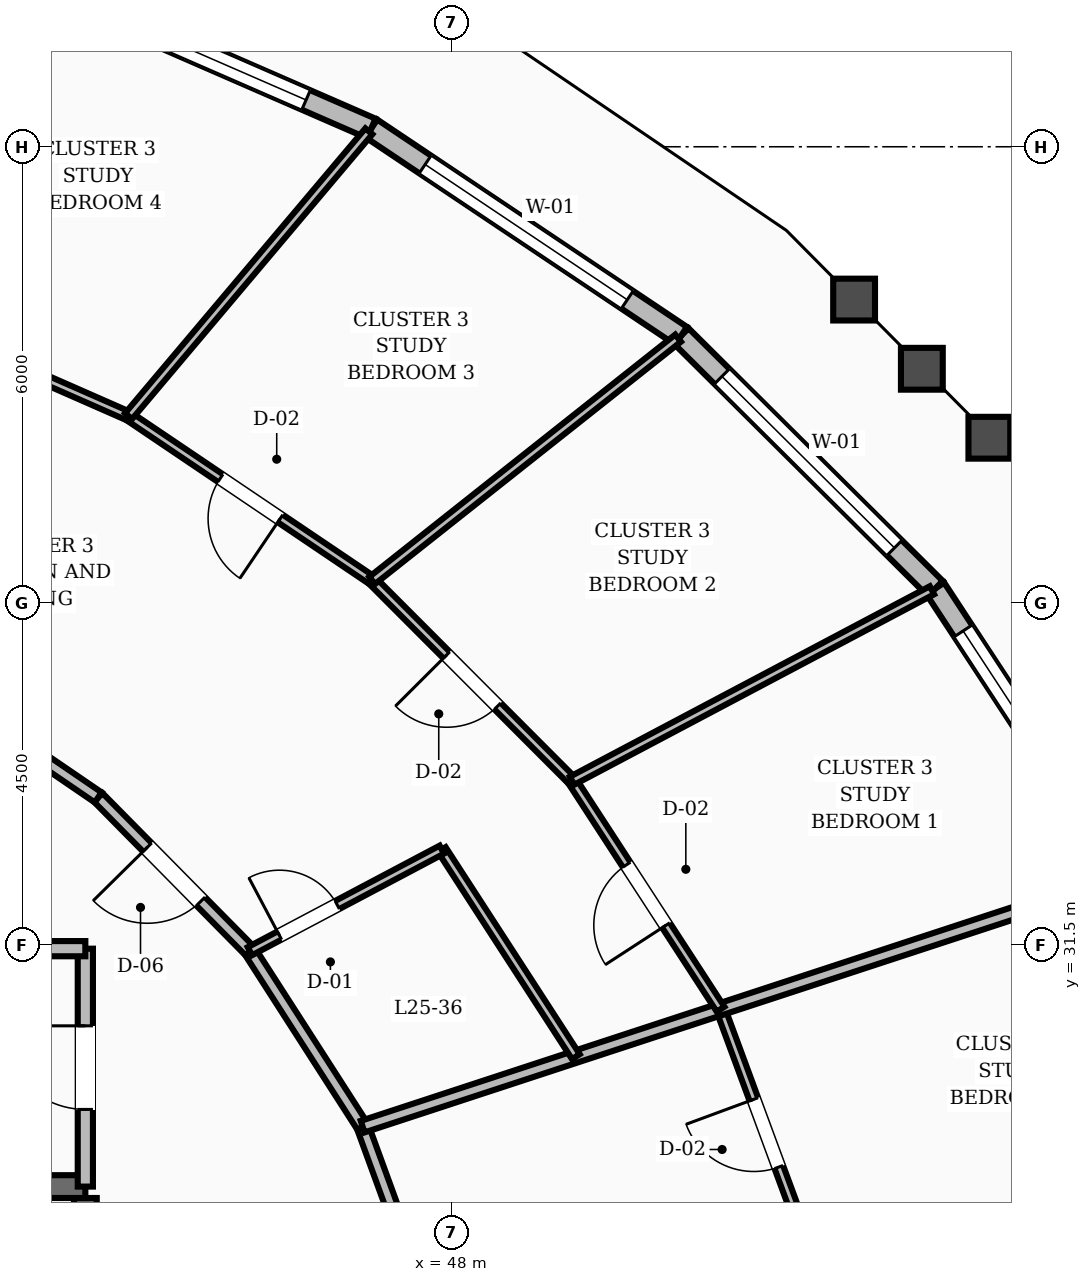
"""IFC4 building model, lengths in metres.
Left out: names, types, materials, properties, quantities, classifications, styles, units other than length and angle.
Written with IfcOpenShell. Run it as: python <this file> out.ifc"""

import sys

from ifc_helpers import new_model, si_unit, direction, frame, frame_2d, origin, place, context, subcontext, project, spatial, rectangle, extrude, element, fill, save


model = new_model("IFC4")
c1 = context("Model", 3, precision=1e-05, world=origin(), true_north=direction((0.0, 1.0)))
c2 = subcontext(c1, "Body", "Model", "MODEL_VIEW")
j1 = project(units=[si_unit("LENGTHUNIT", "METRE"), si_unit("PLANEANGLEUNIT", "RADIAN")], contexts=[c1])
p1 = place(None, origin())
s1 = spatial("IfcSite", under=j1, at=p1, CompositionType="ELEMENT")
p2 = place(p1, origin())
s2 = spatial("IfcBuilding", under=s1, at=p2, CompositionType="ELEMENT")
p3 = place(p2, frame((0.0, 0.0, 98.8)))
s3 = spatial("IfcBuildingStorey", under=s2, at=p3, CompositionType="ELEMENT", Elevation=98.8)
p4 = place(p3, frame((43.18, 19.43, 0.0), z_axis=(0.0, 0.0, 1.0), x_axis=(0.0, 1.0, 0.0)))
e1 = element("IfcWall", 1, at=p4, inside=s3, PredefinedType="SHEAR", context=c2, shape_type="SweptSolid", body=[
    extrude(rectangle(XDim=8.74, YDim=0.3, at=frame_2d((4.37, 0.0))), origin(), (0.0, 0.0, 1.0), 3.6),
])
p5 = place(p3, frame((39.58, 28.32, 0.0), z_axis=(0.0, 0.0, 1.0), x_axis=(1.0, 0.0, 0.0)))
e2 = element("IfcWall", 2, at=p5, inside=s3, PredefinedType="SHEAR", context=c2, shape_type="SweptSolid", body=[
    extrude(rectangle(XDim=3.6, YDim=0.3, at=frame_2d((1.8, 0.0))), origin(), (0.0, 0.0, 1.0), 3.6),
])
p6 = place(p5, frame((1.3, 0.0, 0.0)))
e3 = element("IfcOpeningElement", 3, at=p6, cuts=e2, PredefinedType="OPENING", context=c2, shape_type="SweptSolid", body=[
    extrude(rectangle(XDim=1.1, YDim=2.1, at=frame_2d((0.55, 1.05))), frame((0.0, 0.16, 0.0), z_axis=(0.0, -1.0, 0.0), x_axis=(1.0, 0.0, 0.0)), (0.0, 0.0, 1.0), 0.32),
])
p7 = place(p3, frame((56.848, 32.396, 0.0), z_axis=(0.0, 0.0, 1.0), x_axis=(-0.548073017765, 0.836430491552, 0.0)))
e4 = element("IfcWall", 4, at=p7, inside=s3, PredefinedType="STANDARD", context=c2, shape_type="SweptSolid", body=[
    extrude(rectangle(XDim=4.535, YDim=0.28, at=frame_2d((2.267, 0.0))), origin(), (0.0, 0.0, 1.0), 2.71),
])
p8 = place(p7, frame((0.667, 0.0, 0.8)))
e5 = element("IfcOpeningElement", 5, at=p8, cuts=e4, PredefinedType="OPENING", context=c2, shape_type="SweptSolid", body=[
    extrude(rectangle(XDim=3.2, YDim=1.65, at=frame_2d((1.6, 0.825))), frame((0.0, 0.15, 0.0), z_axis=(0.0, -1.0, 0.0), x_axis=(1.0, 0.0, 0.0)), (0.0, 0.0, 1.0), 0.3),
])
p9 = place(p3, frame((54.362, 36.188, 0.0), z_axis=(0.0, 0.0, 1.0), x_axis=(-0.709251981277, 0.704955053216, 0.0)))
e6 = element("IfcWall", 6, at=p9, inside=s3, PredefinedType="STANDARD", context=c2, shape_type="SweptSolid", body=[
    extrude(rectangle(XDim=4.716, YDim=0.28, at=frame_2d((2.358, 0.0))), origin(), (0.0, 0.0, 1.0), 2.71),
])
p10 = place(p9, frame((0.758, 0.0, 0.8)))
e7 = element("IfcOpeningElement", 7, at=p10, cuts=e6, PredefinedType="OPENING", context=c2, shape_type="SweptSolid", body=[
    extrude(rectangle(XDim=3.2, YDim=1.65, at=frame_2d((1.6, 0.825))), frame((0.0, 0.15, 0.0), z_axis=(0.0, -1.0, 0.0), x_axis=(1.0, 0.0, 0.0)), (0.0, 0.0, 1.0), 0.3),
])
p11 = place(p3, frame((51.018, 39.513, 0.0), z_axis=(0.0, 0.0, 1.0), x_axis=(-0.83098422739, 0.556295976822, 0.0)))
e8 = element("IfcWall", 8, at=p11, inside=s3, PredefinedType="STANDARD", context=c2, shape_type="SweptSolid", body=[
    extrude(rectangle(XDim=4.904, YDim=0.28, at=frame_2d((2.452, 0.0))), origin(), (0.0, 0.0, 1.0), 2.71),
])
p12 = place(p11, frame((0.852, 0.0, 0.8)))
e9 = element("IfcOpeningElement", 9, at=p12, cuts=e8, PredefinedType="OPENING", context=c2, shape_type="SweptSolid", body=[
    extrude(rectangle(XDim=3.2, YDim=1.65, at=frame_2d((1.6, 0.825))), frame((0.0, 0.15, 0.0), z_axis=(0.0, -1.0, 0.0), x_axis=(1.0, 0.0, 0.0)), (0.0, 0.0, 1.0), 0.3),
])
p13 = place(p3, frame((46.942, 42.241, 0.0), z_axis=(0.0, 0.0, 1.0), x_axis=(-0.9166625106, 0.399662159405, 0.0)))
e10 = element("IfcWall", 10, at=p13, inside=s3, PredefinedType="STANDARD", context=c2, shape_type="SweptSolid", body=[
    extrude(rectangle(XDim=5.073, YDim=0.28, at=frame_2d((2.536, 0.0))), origin(), (0.0, 0.0, 1.0), 2.71),
])
p14 = place(p13, frame((0.936, 0.0, 0.8)))
e11 = element("IfcOpeningElement", 11, at=p14, cuts=e10, PredefinedType="OPENING", context=c2, shape_type="SweptSolid", body=[
    extrude(rectangle(XDim=3.2, YDim=1.65, at=frame_2d((1.6, 0.825))), frame((0.0, 0.15, 0.0), z_axis=(0.0, -1.0, 0.0), x_axis=(1.0, 0.0, 0.0)), (0.0, 0.0, 1.0), 0.3),
])
p15 = place(p3, frame((43.18, 28.32, 0.0), z_axis=(0.0, 0.0, 1.0), x_axis=(0.0, 1.0, 0.0)))
e12 = element("IfcWall", 12, at=p15, inside=s3, PredefinedType="SOLIDWALL", context=c2, shape_type="SweptSolid", body=[
    extrude(rectangle(XDim=3.13, YDim=0.2, at=frame_2d((1.565, 0.0))), origin(), (0.0, 0.0, 1.0), 2.71),
])
p16 = place(p15, frame((1.015, 0.0, 0.0)))
e13 = element("IfcOpeningElement", 13, at=p16, cuts=e12, PredefinedType="OPENING", context=c2, shape_type="SweptSolid", body=[
    extrude(rectangle(XDim=1.1, YDim=2.1, at=frame_2d((0.55, 1.05))), frame((0.0, 0.11, 0.0), z_axis=(0.0, -1.0, 0.0), x_axis=(1.0, 0.0, 0.0)), (0.0, 0.0, 1.0), 0.22),
])
p17 = place(p3, frame((39.2, 31.45, 0.0), z_axis=(0.0, 0.0, 1.0), x_axis=(1.0, 0.0, 0.0)))
e14 = element("IfcWall", 14, at=p17, inside=s3, PredefinedType="SOLIDWALL", context=c2, shape_type="SweptSolid", body=[
    extrude(rectangle(XDim=3.98, YDim=0.2, at=frame_2d((1.99, 0.0))), origin(), (0.0, 0.0, 1.0), 2.71),
])
p18 = place(p3, frame((47.742, 26.604, 0.0), z_axis=(0.0, 0.0, 1.0), x_axis=(-0.342617982381, 0.939474809747, 0.0)))
e15 = element("IfcWall", 15, at=p18, inside=s3, PredefinedType="SOLIDWALL", context=c2, shape_type="SweptSolid", body=[
    extrude(rectangle(XDim=2.666, YDim=0.16, at=frame_2d((1.333, 0.0))), origin(), (0.0, 0.0, 1.0), 2.71),
])
p19 = place(p3, frame((46.828, 29.109, 0.0), z_axis=(0.0, 0.0, 1.0), x_axis=(-0.540595670038, 0.841282545603, 0.0)))
e16 = element("IfcWall", 16, at=p19, inside=s3, PredefinedType="SOLIDWALL", context=c2, shape_type="SweptSolid", body=[
    extrude(rectangle(XDim=2.744, YDim=0.16, at=frame_2d((1.372, 0.0))), origin(), (0.0, 0.0, 1.0), 2.71),
])
p20 = place(p3, frame((45.345, 31.417, 0.0), z_axis=(0.0, 0.0, 1.0), x_axis=(-0.702366174226, 0.711815816981, 0.0)))
e17 = element("IfcWall", 17, at=p20, inside=s3, PredefinedType="SOLIDWALL", context=c2, shape_type="SweptSolid", body=[
    extrude(rectangle(XDim=2.842, YDim=0.16, at=frame_2d((1.421, 0.0))), origin(), (0.0, 0.0, 1.0), 2.71),
])
p21 = place(p20, frame((0.921, 0.0, 0.0)))
e18 = element("IfcOpeningElement", 18, at=p21, cuts=e17, PredefinedType="OPENING", context=c2, shape_type="SweptSolid", body=[
    extrude(rectangle(XDim=1.0, YDim=2.1, at=frame_2d((0.5, 1.05))), frame((0.0, 0.09, 0.0), z_axis=(0.0, -1.0, 0.0), x_axis=(1.0, 0.0, 0.0)), (0.0, 0.0, 1.0), 0.18),
])
p22 = place(p3, frame((43.349, 33.44, 0.0), z_axis=(0.0, 0.0, 1.0), x_axis=(-0.825929039072, 0.563774088104, 0.0)))
e19 = element("IfcWall", 19, at=p22, inside=s3, PredefinedType="SOLIDWALL", context=c2, shape_type="SweptSolid", body=[
    extrude(rectangle(XDim=2.945, YDim=0.16, at=frame_2d((1.472, 0.0))), origin(), (0.0, 0.0, 1.0), 2.71),
])
p23 = place(p3, frame((52.741, 27.392, 0.0), z_axis=(0.0, 0.0, 1.0), x_axis=(-0.346154436664, 0.938177545019, 0.0)))
e20 = element("IfcWall", 20, at=p23, inside=s3, PredefinedType="PARTITIONING", context=c2, shape_type="SweptSolid", body=[
    extrude(rectangle(XDim=3.476, YDim=0.12, at=frame_2d((1.738, 0.0))), origin(), (0.0, 0.0, 1.0), 2.71),
])
p24 = place(p23, frame((1.263, 0.0, 0.0)))
e21 = element("IfcOpeningElement", 21, at=p24, cuts=e20, PredefinedType="OPENING", context=c2, shape_type="SweptSolid", body=[
    extrude(rectangle(XDim=0.95, YDim=2.1, at=frame_2d((0.475, 1.05))), frame((0.0, 0.07, 0.0), z_axis=(0.0, -1.0, 0.0), x_axis=(1.0, 0.0, 0.0)), (0.0, 0.0, 1.0), 0.14),
])
p25 = place(p3, frame((52.741, 27.392, 0.0), z_axis=(0.0, 0.0, 1.0), x_axis=(0.987823078451, 0.155581379607, 0.0)))
e22 = element("IfcWall", 22, at=p25, inside=s3, PredefinedType="PARTITIONING", context=c2, shape_type="SweptSolid", body=[
    extrude(rectangle(XDim=5.657, YDim=0.12, at=frame_2d((2.829, 0.0))), origin(), (0.0, 0.0, 1.0), 2.71),
])
p26 = place(p3, frame((46.828, 29.109, 0.0), z_axis=(0.0, 0.0, 1.0), x_axis=(0.950186855509, 0.311680829725, 0.0)))
e23 = element("IfcWall", 23, at=p26, inside=s3, PredefinedType="SOLIDWALL", context=c2, shape_type="SweptSolid", body=[
    extrude(rectangle(XDim=10.495, YDim=0.16, at=frame_2d((5.247, 0.0))), origin(), (0.0, 0.0, 1.0), 2.71),
])
p27 = place(p3, frame((49.634, 30.029, 0.0), z_axis=(0.0, 0.0, 1.0), x_axis=(-0.543556944185, 0.839372294294, 0.0)))
e24 = element("IfcWall", 24, at=p27, inside=s3, PredefinedType="PARTITIONING", context=c2, shape_type="SweptSolid", body=[
    extrude(rectangle(XDim=3.245, YDim=0.12, at=frame_2d((1.623, 0.0))), origin(), (0.0, 0.0, 1.0), 2.71),
])
p28 = place(p3, frame((45.345, 31.417, 0.0), z_axis=(0.0, 0.0, 1.0), x_axis=(0.883881457509, 0.46771098883, 0.0)))
e25 = element("IfcWall", 25, at=p28, inside=s3, PredefinedType="PARTITIONING", context=c2, shape_type="SweptSolid", body=[
    extrude(rectangle(XDim=2.856, YDim=0.12, at=frame_2d((1.428, 0.0))), origin(), (0.0, 0.0, 1.0), 2.71),
])
p29 = place(p28, frame((0.44, 0.0, 0.0)))
e26 = element("IfcOpeningElement", 26, at=p29, cuts=e25, PredefinedType="OPENING", context=c2, shape_type="SweptSolid", body=[
    extrude(rectangle(XDim=0.86, YDim=2.1, at=frame_2d((0.43, 1.05))), frame((0.0, 0.07, 0.0), z_axis=(0.0, -1.0, 0.0), x_axis=(1.0, 0.0, 0.0)), (0.0, 0.0, 1.0), 0.14),
])
p30 = place(p3, frame((51.537, 30.654, 0.0), z_axis=(0.0, 0.0, 1.0), x_axis=(-0.545045794667, 0.838406274855, 0.0)))
e27 = element("IfcWall", 27, at=p30, inside=s3, PredefinedType="PARTITIONING", context=c2, shape_type="SweptSolid", body=[
    extrude(rectangle(XDim=3.585, YDim=0.12, at=frame_2d((1.792, 0.0))), origin(), (0.0, 0.0, 1.0), 2.71),
])
p31 = place(p30, frame((1.318, 0.0, 0.0)))
e28 = element("IfcOpeningElement", 28, at=p31, cuts=e27, PredefinedType="OPENING", context=c2, shape_type="SweptSolid", body=[
    extrude(rectangle(XDim=0.95, YDim=2.1, at=frame_2d((0.475, 1.05))), frame((0.0, 0.07, 0.0), z_axis=(0.0, -1.0, 0.0), x_axis=(1.0, 0.0, 0.0)), (0.0, 0.0, 1.0), 0.14),
])
p32 = place(p3, frame((49.583, 33.659, 0.0), z_axis=(0.0, 0.0, 1.0), x_axis=(-0.706450655804, 0.707762298314, 0.0)))
e29 = element("IfcWall", 29, at=p32, inside=s3, PredefinedType="PARTITIONING", context=c2, shape_type="SweptSolid", body=[
    extrude(rectangle(XDim=3.723, YDim=0.12, at=frame_2d((1.861, 0.0))), origin(), (0.0, 0.0, 1.0), 2.71),
])
p33 = place(p32, frame((1.386, 0.0, 0.0)))
e30 = element("IfcOpeningElement", 30, at=p33, cuts=e29, PredefinedType="OPENING", context=c2, shape_type="SweptSolid", body=[
    extrude(rectangle(XDim=0.95, YDim=2.1, at=frame_2d((0.475, 1.05))), frame((0.0, 0.07, 0.0), z_axis=(0.0, -1.0, 0.0), x_axis=(1.0, 0.0, 0.0)), (0.0, 0.0, 1.0), 0.14),
])
p34 = place(p3, frame((49.583, 33.659, 0.0), z_axis=(0.0, 0.0, 1.0), x_axis=(0.883871044987, 0.467730665912, 0.0)))
e31 = element("IfcWall", 31, at=p34, inside=s3, PredefinedType="PARTITIONING", context=c2, shape_type="SweptSolid", body=[
    extrude(rectangle(XDim=5.357, YDim=0.12, at=frame_2d((2.678, 0.0))), origin(), (0.0, 0.0, 1.0), 2.71),
])
p35 = place(p3, frame((46.953, 36.294, 0.0), z_axis=(0.0, 0.0, 1.0), x_axis=(-0.828967263528, 0.559297126757, 0.0)))
e32 = element("IfcWall", 32, at=p35, inside=s3, PredefinedType="PARTITIONING", context=c2, shape_type="SweptSolid", body=[
    extrude(rectangle(XDim=3.866, YDim=0.12, at=frame_2d((1.933, 0.0))), origin(), (0.0, 0.0, 1.0), 2.71),
])
p36 = place(p35, frame((1.458, 0.0, 0.0)))
e33 = element("IfcOpeningElement", 33, at=p36, cuts=e32, PredefinedType="OPENING", context=c2, shape_type="SweptSolid", body=[
    extrude(rectangle(XDim=0.95, YDim=2.1, at=frame_2d((0.475, 1.05))), frame((0.0, 0.07, 0.0), z_axis=(0.0, -1.0, 0.0), x_axis=(1.0, 0.0, 0.0)), (0.0, 0.0, 1.0), 0.14),
])
p37 = place(p3, frame((46.953, 36.294, 0.0), z_axis=(0.0, 0.0, 1.0), x_axis=(0.783934932715, 0.620842992446, 0.0)))
e34 = element("IfcWall", 34, at=p37, inside=s3, PredefinedType="PARTITIONING", context=c2, shape_type="SweptSolid", body=[
    extrude(rectangle(XDim=5.135, YDim=0.12, at=frame_2d((2.567, 0.0))), origin(), (0.0, 0.0, 1.0), 2.71),
])
p38 = place(p3, frame((43.749, 38.456, 0.0), z_axis=(0.0, 0.0, 1.0), x_axis=(-0.915495231318, 0.402328822524, 0.0)))
e35 = element("IfcWall", 35, at=p38, inside=s3, PredefinedType="PARTITIONING", context=c2, shape_type="SweptSolid", body=[
    extrude(rectangle(XDim=3.993, YDim=0.12, at=frame_2d((1.997, 0.0))), origin(), (0.0, 0.0, 1.0), 2.71),
])
p39 = place(p38, frame((1.522, 0.0, 0.0)))
e36 = element("IfcOpeningElement", 36, at=p39, cuts=e35, PredefinedType="OPENING", context=c2, shape_type="SweptSolid", body=[
    extrude(rectangle(XDim=0.95, YDim=2.1, at=frame_2d((0.475, 1.05))), frame((0.0, 0.07, 0.0), z_axis=(0.0, -1.0, 0.0), x_axis=(1.0, 0.0, 0.0)), (0.0, 0.0, 1.0), 0.14),
])
p40 = place(p3, frame((43.749, 38.456, 0.0), z_axis=(0.0, 0.0, 1.0), x_axis=(0.644865484306, 0.764296086049, 0.0)))
e37 = element("IfcWall", 37, at=p40, inside=s3, PredefinedType="PARTITIONING", context=c2, shape_type="SweptSolid", body=[
    extrude(rectangle(XDim=4.902, YDim=0.12, at=frame_2d((2.451, 0.0))), origin(), (0.0, 0.0, 1.0), 2.71),
])
p41 = place(p8, origin())
e38 = element("IfcWindow", 38, at=p41, inside=s3, PartitioningType="SINGLE_PANEL", PredefinedType="WINDOW", context=c2, shape_type="SweptSolid", body=[
    extrude(rectangle(XDim=3.2, YDim=1.65, at=frame_2d((1.6, 0.825))), frame((0.0, 0.03, 0.0), z_axis=(0.0, -1.0, 0.0), x_axis=(1.0, 0.0, 0.0)), (0.0, 0.0, 1.0), 0.06),
])
fill(e5, e38)
p42 = place(p10, origin())
e39 = element("IfcWindow", 39, at=p42, inside=s3, PartitioningType="SINGLE_PANEL", PredefinedType="WINDOW", context=c2, shape_type="SweptSolid", body=[
    extrude(rectangle(XDim=3.2, YDim=1.65, at=frame_2d((1.6, 0.825))), frame((0.0, 0.03, 0.0), z_axis=(0.0, -1.0, 0.0), x_axis=(1.0, 0.0, 0.0)), (0.0, 0.0, 1.0), 0.06),
])
fill(e7, e39)
p43 = place(p12, origin())
e40 = element("IfcWindow", 40, at=p43, inside=s3, PartitioningType="SINGLE_PANEL", PredefinedType="WINDOW", context=c2, shape_type="SweptSolid", body=[
    extrude(rectangle(XDim=3.2, YDim=1.65, at=frame_2d((1.6, 0.825))), frame((0.0, 0.03, 0.0), z_axis=(0.0, -1.0, 0.0), x_axis=(1.0, 0.0, 0.0)), (0.0, 0.0, 1.0), 0.06),
])
fill(e9, e40)
p44 = place(p14, origin())
e41 = element("IfcWindow", 41, at=p44, inside=s3, PartitioningType="SINGLE_PANEL", PredefinedType="WINDOW", context=c2, shape_type="SweptSolid", body=[
    extrude(rectangle(XDim=3.2, YDim=1.65, at=frame_2d((1.6, 0.825))), frame((0.0, 0.03, 0.0), z_axis=(0.0, -1.0, 0.0), x_axis=(1.0, 0.0, 0.0)), (0.0, 0.0, 1.0), 0.06),
])
fill(e11, e41)
p45 = place(p16, origin())
e42 = element("IfcDoor", 42, at=p45, inside=s3, OperationType="SINGLE_SWING_RIGHT", PredefinedType="DOOR", context=c2, shape_type="SweptSolid", body=[
    extrude(rectangle(XDim=1.1, YDim=2.1, at=frame_2d((0.55, 1.05))), frame((0.0, 0.025, 0.0), z_axis=(0.0, -1.0, 0.0), x_axis=(1.0, 0.0, 0.0)), (0.0, 0.0, 1.0), 0.05),
])
fill(e13, e42)
p46 = place(p24, origin())
e43 = element("IfcDoor", 43, at=p46, inside=s3, OperationType="SINGLE_SWING_RIGHT", PredefinedType="DOOR", context=c2, shape_type="SweptSolid", body=[
    extrude(rectangle(XDim=0.95, YDim=2.1, at=frame_2d((0.475, 1.05))), frame((0.0, 0.025, 0.0), z_axis=(0.0, -1.0, 0.0), x_axis=(1.0, 0.0, 0.0)), (0.0, 0.0, 1.0), 0.05),
])
fill(e21, e43)
p47 = place(p29, origin())
e44 = element("IfcDoor", 44, at=p47, inside=s3, OperationType="SINGLE_SWING_LEFT", PredefinedType="DOOR", context=c2, shape_type="SweptSolid", body=[
    extrude(rectangle(XDim=0.86, YDim=2.1, at=frame_2d((0.43, 1.05))), frame((0.0, 0.025, 0.0), z_axis=(0.0, -1.0, 0.0), x_axis=(1.0, 0.0, 0.0)), (0.0, 0.0, 1.0), 0.05),
])
fill(e26, e44)
p48 = place(p21, origin())
e45 = element("IfcDoor", 45, at=p48, inside=s3, OperationType="SINGLE_SWING_RIGHT", PredefinedType="DOOR", context=c2, shape_type="SweptSolid", body=[
    extrude(rectangle(XDim=1.0, YDim=2.1, at=frame_2d((0.5, 1.05))), frame((0.0, 0.025, 0.0), z_axis=(0.0, -1.0, 0.0), x_axis=(1.0, 0.0, 0.0)), (0.0, 0.0, 1.0), 0.05),
])
fill(e18, e45)
p49 = place(p31, origin())
e46 = element("IfcDoor", 46, at=p49, inside=s3, OperationType="SINGLE_SWING_LEFT", PredefinedType="DOOR", context=c2, shape_type="SweptSolid", body=[
    extrude(rectangle(XDim=0.95, YDim=2.1, at=frame_2d((0.475, 1.05))), frame((0.0, 0.025, 0.0), z_axis=(0.0, -1.0, 0.0), x_axis=(1.0, 0.0, 0.0)), (0.0, 0.0, 1.0), 0.05),
])
fill(e28, e46)
p50 = place(p33, origin())
e47 = element("IfcDoor", 47, at=p50, inside=s3, OperationType="SINGLE_SWING_RIGHT", PredefinedType="DOOR", context=c2, shape_type="SweptSolid", body=[
    extrude(rectangle(XDim=0.95, YDim=2.1, at=frame_2d((0.475, 1.05))), frame((0.0, 0.025, 0.0), z_axis=(0.0, -1.0, 0.0), x_axis=(1.0, 0.0, 0.0)), (0.0, 0.0, 1.0), 0.05),
])
fill(e30, e47)
p51 = place(p36, origin())
e48 = element("IfcDoor", 48, at=p51, inside=s3, OperationType="SINGLE_SWING_LEFT", PredefinedType="DOOR", context=c2, shape_type="SweptSolid", body=[
    extrude(rectangle(XDim=0.95, YDim=2.1, at=frame_2d((0.475, 1.05))), frame((0.0, 0.025, 0.0), z_axis=(0.0, -1.0, 0.0), x_axis=(1.0, 0.0, 0.0)), (0.0, 0.0, 1.0), 0.05),
])
fill(e33, e48)
save(model, sys.argv[1])
